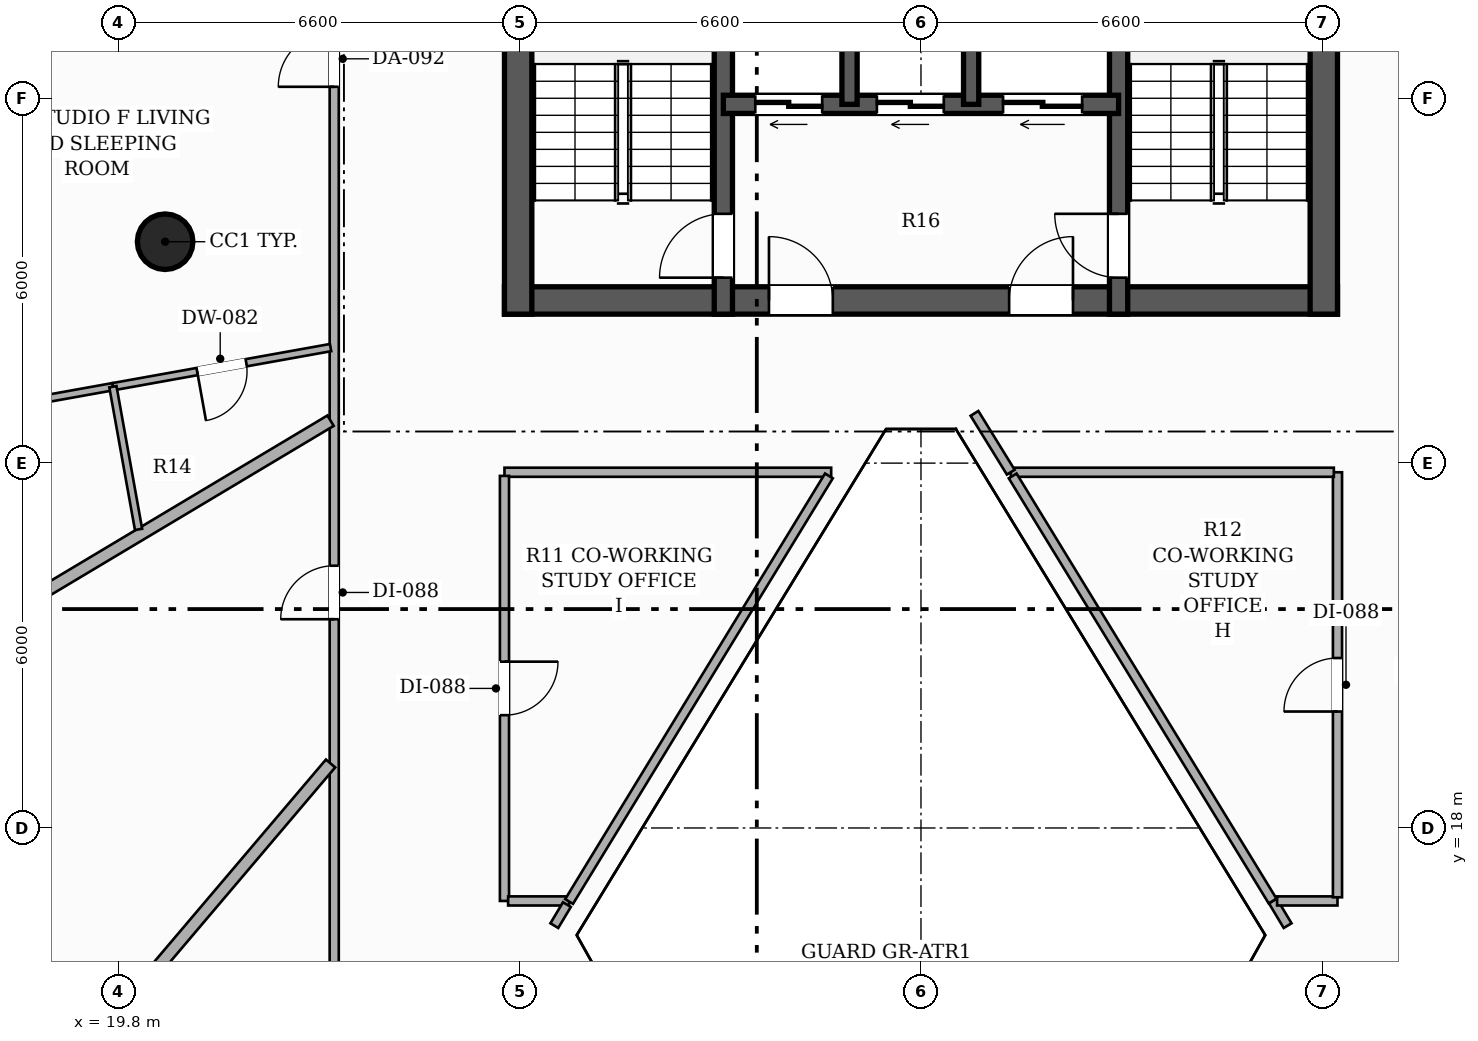
"""IFC4 building model, lengths in metres.
Left out: names, types, materials, properties, quantities, classifications, styles, units other than length and angle.
Written with IfcOpenShell. Run it as: python <this file> out.ifc"""

import sys

from ifc_helpers import new_model, si_unit, direction, frame, frame_2d, origin, origin_2d, place, context, subcontext, project, spatial, rectangle, hollow_circle, extrude, element, fill, save


model = new_model("IFC4")
c1 = context("Model", 3, precision=1e-05, world=origin(), true_north=direction((0.0, 1.0)))
c2 = subcontext(c1, "Body", "Model", "MODEL_VIEW")
j1 = project(units=[si_unit("LENGTHUNIT", "METRE"), si_unit("PLANEANGLEUNIT", "RADIAN")], contexts=[c1])
p1 = place(None, origin())
s1 = spatial("IfcSite", under=j1, at=p1, CompositionType="ELEMENT")
p2 = place(p1, origin())
s2 = spatial("IfcBuilding", under=s1, at=p2, CompositionType="ELEMENT")
p3 = place(p2, frame((0.0, 0.0, 23.6)))
s3 = spatial("IfcBuildingStorey", under=s2, at=p3, CompositionType="ELEMENT", Elevation=23.6)
p4 = place(p3, frame((26.15, 26.675, 0.0), z_axis=(0.0, 0.0, 1.0), x_axis=(1.0, 0.0, 0.0)))
e1 = element("IfcWall", 1, at=p4, inside=s3, PredefinedType="SHEAR", context=c2, shape_type="SweptSolid", body=[
    extrude(rectangle(XDim=13.7, YDim=0.45, at=frame_2d((6.85, 0.0))), origin(), (0.0, 0.0, 1.0), 3.3),
])
p5 = place(p4, frame((4.35, 0.0, 0.0)))
e2 = element("IfcOpeningElement", 2, at=p5, cuts=e1, PredefinedType="OPENING", context=c2, shape_type="SweptSolid", body=[
    extrude(rectangle(XDim=1.05, YDim=2.15, at=frame_2d((0.525, 1.075))), frame((0.0, 0.235, 0.0), z_axis=(0.0, -1.0, 0.0), x_axis=(1.0, 0.0, 0.0)), (0.0, 0.0, 1.0), 0.47),
])
p6 = place(p4, frame((8.3, 0.0, 0.0)))
e3 = element("IfcOpeningElement", 3, at=p6, cuts=e1, PredefinedType="OPENING", context=c2, shape_type="SweptSolid", body=[
    extrude(rectangle(XDim=1.05, YDim=2.15, at=frame_2d((0.525, 1.075))), frame((0.0, 0.235, 0.0), z_axis=(0.0, -1.0, 0.0), x_axis=(1.0, 0.0, 0.0)), (0.0, 0.0, 1.0), 0.47),
])
for number, where, z_axis, x_axis in (
    (4, (26.375, 26.45, 0.0), (0.0, 0.0, 1.0), (0.0, 1.0, 0.0)),
    (5, (39.625, 26.45, 0.0), (0.0, 0.0, 1.0), (0.0, 1.0, 0.0)),
):
    element("IfcWall", number, at=place(p3, frame(where, z_axis=z_axis, x_axis=x_axis)), inside=s3, PredefinedType="SHEAR", context=c2, shape_type="SweptSolid", body=[
        extrude(rectangle(XDim=7.7, YDim=0.45, at=frame_2d((3.85, 0.0))), origin(), (0.0, 0.0, 1.0), 3.3),
    ])
p7 = place(p3, frame((29.75, 26.45, 0.0), z_axis=(0.0, 0.0, 1.0), x_axis=(0.0, 1.0, 0.0)))
e6 = element("IfcWall", 6, at=p7, inside=s3, PredefinedType="SHEAR", context=c2, shape_type="SweptSolid", body=[
    extrude(rectangle(XDim=8.2, YDim=0.3, at=frame_2d((4.1, 0.0))), origin(), (0.0, 0.0, 1.0), 3.3),
])
p8 = place(p7, frame((0.6, 0.0, 0.0)))
e7 = element("IfcOpeningElement", 7, at=p8, cuts=e6, PredefinedType="OPENING", context=c2, shape_type="SweptSolid", body=[
    extrude(rectangle(XDim=1.05, YDim=2.15, at=frame_2d((0.525, 1.075))), frame((0.0, 0.16, 0.0), z_axis=(0.0, -1.0, 0.0), x_axis=(1.0, 0.0, 0.0)), (0.0, 0.0, 1.0), 0.32),
])
p9 = place(p3, frame((36.25, 26.45, 0.0), z_axis=(0.0, 0.0, 1.0), x_axis=(0.0, 1.0, 0.0)))
e8 = element("IfcWall", 8, at=p9, inside=s3, PredefinedType="SHEAR", context=c2, shape_type="SweptSolid", body=[
    extrude(rectangle(XDim=8.2, YDim=0.3, at=frame_2d((4.1, 0.0))), origin(), (0.0, 0.0, 1.0), 3.3),
])
p10 = place(p9, frame((0.6, 0.0, 0.0)))
e9 = element("IfcOpeningElement", 9, at=p10, cuts=e8, PredefinedType="OPENING", context=c2, shape_type="SweptSolid", body=[
    extrude(rectangle(XDim=1.05, YDim=2.15, at=frame_2d((0.525, 1.075))), frame((0.0, 0.16, 0.0), z_axis=(0.0, -1.0, 0.0), x_axis=(1.0, 0.0, 0.0)), (0.0, 0.0, 1.0), 0.32),
])
p11 = place(p3, frame((36.25, 29.9, 0.0), z_axis=(0.0, 0.0, 1.0), x_axis=(-1.0, 0.0, 0.0)))
e10 = element("IfcWall", 10, at=p11, inside=s3, PredefinedType="SHEAR", context=c2, shape_type="SweptSolid", body=[
    extrude(rectangle(XDim=6.5, YDim=0.3, at=frame_2d((3.25, 0.0))), origin(), (0.0, 0.0, 1.0), 3.3),
])
p12 = place(p11, frame((4.875, 0.0, 0.0)))
e11 = element("IfcOpeningElement", 11, at=p12, cuts=e10, PredefinedType="OPENING", context=c2, shape_type="SweptSolid", body=[
    extrude(rectangle(XDim=1.1, YDim=2.2, at=frame_2d((0.55, 1.1))), frame((0.0, 0.16, 0.0), z_axis=(0.0, -1.0, 0.0), x_axis=(1.0, 0.0, 0.0)), (0.0, 0.0, 1.0), 0.32),
])
p13 = place(p11, frame((2.875, 0.0, 0.0)))
e12 = element("IfcOpeningElement", 12, at=p13, cuts=e10, PredefinedType="OPENING", context=c2, shape_type="SweptSolid", body=[
    extrude(rectangle(XDim=1.1, YDim=2.2, at=frame_2d((0.55, 1.1))), frame((0.0, 0.16, 0.0), z_axis=(0.0, -1.0, 0.0), x_axis=(1.0, 0.0, 0.0)), (0.0, 0.0, 1.0), 0.32),
])
p14 = place(p11, frame((0.6, 0.0, 0.0)))
e13 = element("IfcOpeningElement", 13, at=p14, cuts=e10, PredefinedType="OPENING", context=c2, shape_type="SweptSolid", body=[
    extrude(rectangle(XDim=1.3, YDim=2.2, at=frame_2d((0.65, 1.1))), frame((0.0, 0.16, 0.0), z_axis=(0.0, -1.0, 0.0), x_axis=(1.0, 0.0, 0.0)), (0.0, 0.0, 1.0), 0.32),
])
for number, where, z_axis, x_axis in (
    (14, (31.825, 29.9, 0.0), (0.0, 0.0, 1.0), (0.0, 1.0, 0.0)),
    (15, (33.825, 29.9, 0.0), (0.0, 0.0, 1.0), (0.0, 1.0, 0.0)),
):
    element("IfcWall", number, at=place(p3, frame(where, z_axis=z_axis, x_axis=x_axis)), inside=s3, PredefinedType="SHEAR", context=c2, shape_type="SweptSolid", body=[
        extrude(rectangle(XDim=2.9, YDim=0.25, at=frame_2d((1.45, 0.0))), origin(), (0.0, 0.0, 1.0), 3.3),
    ])
p15 = place(p3, frame((20.569, 27.641, 0.0), z_axis=(0.0, 0.0, 1.0), x_axis=(1.0, 0.0, 0.0)))
e16 = element("IfcColumn", 16, at=p15, inside=s3, PredefinedType="COLUMN", context=c2, shape_type="SweptSolid", body=[
    extrude(hollow_circle(Radius=0.457, WallThickness=0.025, at=origin_2d()), origin(), (0.0, 0.0, 1.0), 3.3),
])
p16 = place(p3, frame((18.957, 36.16, 0.0), z_axis=(0.0, 0.0, 1.0), x_axis=(-0.514409031138, -0.857544954323, 0.0)))
e17 = element("IfcWall", 17, at=p16, inside=s3, PredefinedType="SOLIDWALL", context=c2, shape_type="SweptSolid", body=[
    extrude(rectangle(XDim=13.248, YDim=0.24, at=frame_2d((6.624, 0.0))), origin(), (0.0, 0.0, 1.0), 2.624),
])
p17 = place(p16, frame((5.724, 0.0, 0.0)))
e18 = element("IfcOpeningElement", 18, at=p17, cuts=e17, PredefinedType="OPENING", context=c2, shape_type="SweptSolid", body=[
    extrude(rectangle(XDim=1.8, YDim=2.2, at=frame_2d((0.9, 1.1))), frame((0.0, 0.13, 0.0), z_axis=(0.0, -1.0, 0.0), x_axis=(1.0, 0.0, 0.0)), (0.0, 0.0, 1.0), 0.26),
])
p18 = place(p3, frame((23.35, 11.86, 0.0), z_axis=(0.0, 0.0, 1.0), x_axis=(0.0, 1.0, 0.0)))
e19 = element("IfcWall", 19, at=p18, inside=s3, PredefinedType="PARTITIONING", context=c2, shape_type="SweptSolid", body=[
    extrude(rectangle(XDim=25.04, YDim=0.15, at=frame_2d((12.52, 0.0))), origin(), (0.0, 0.0, 1.0), 2.413),
])
p19 = place(p18, frame((9.573, 0.0, 0.0)))
e20 = element("IfcOpeningElement", 20, at=p19, cuts=e19, PredefinedType="OPENING", context=c2, shape_type="SweptSolid", body=[
    extrude(rectangle(XDim=0.88, YDim=2.1, at=frame_2d((0.44, 1.05))), frame((0.0, 0.085, 0.0), z_axis=(0.0, -1.0, 0.0), x_axis=(1.0, 0.0, 0.0)), (0.0, 0.0, 1.0), 0.17),
])
p20 = place(p18, frame((18.329, 0.0, 0.0)))
e21 = element("IfcOpeningElement", 21, at=p20, cuts=e19, PredefinedType="OPENING", context=c2, shape_type="SweptSolid", body=[
    extrude(rectangle(XDim=0.92, YDim=2.15, at=frame_2d((0.46, 1.075))), frame((0.0, 0.085, 0.0), z_axis=(0.0, -1.0, 0.0), x_axis=(1.0, 0.0, 0.0)), (0.0, 0.0, 1.0), 0.17),
])
p21 = place(p3, frame((31.523, 23.85, 0.0), z_axis=(0.0, 0.0, 1.0), x_axis=(-1.0, 0.0, 0.0)))
e22 = element("IfcWall", 22, at=p21, inside=s3, PredefinedType="PARTITIONING", context=c2, shape_type="SweptSolid", body=[
    extrude(rectangle(XDim=5.373, YDim=0.15, at=frame_2d((2.687, 0.0))), origin(), (0.0, 0.0, 1.0), 2.669),
])
p22 = place(p3, frame((26.15, 23.79, 0.0), z_axis=(0.0, 0.0, 1.0), x_axis=(0.0, -1.0, 0.0)))
e23 = element("IfcWall", 23, at=p22, inside=s3, PredefinedType="PARTITIONING", context=c2, shape_type="SweptSolid", body=[
    extrude(rectangle(XDim=6.99, YDim=0.15, at=frame_2d((3.495, 0.0))), origin(), (0.0, 0.0, 1.0), 2.669),
])
p23 = place(p22, frame((3.055, 0.0, 0.0)))
e24 = element("IfcOpeningElement", 24, at=p23, cuts=e23, PredefinedType="OPENING", context=c2, shape_type="SweptSolid", body=[
    extrude(rectangle(XDim=0.88, YDim=2.1, at=frame_2d((0.44, 1.05))), frame((0.0, 0.085, 0.0), z_axis=(0.0, -1.0, 0.0), x_axis=(1.0, 0.0, 0.0)), (0.0, 0.0, 1.0), 0.17),
])
p24 = place(p3, frame((26.21, 16.8, 0.0), z_axis=(0.0, 0.0, 1.0), x_axis=(1.0, 0.0, 0.0)))
e25 = element("IfcWall", 25, at=p24, inside=s3, PredefinedType="PARTITIONING", context=c2, shape_type="SweptSolid", body=[
    extrude(rectangle(XDim=1.003, YDim=0.15, at=frame_2d((0.501, 0.0))), origin(), (0.0, 0.0, 1.0), 3.06),
])
p25 = place(p3, frame((27.177, 16.74, 0.0), z_axis=(0.0, 0.0, 1.0), x_axis=(-0.513515835534, -0.858080116688, 0.0)))
e26 = element("IfcWall", 26, at=p25, inside=s3, PredefinedType="PARTITIONING", context=c2, shape_type="SweptSolid", body=[
    extrude(rectangle(XDim=0.403, YDim=0.15, at=frame_2d((0.202, 0.0))), origin(), (0.0, 0.0, 1.0), 3.06),
])
p26 = place(p3, frame((39.03, 16.394, 0.0), z_axis=(0.0, 0.0, 1.0), x_axis=(-0.51343298076, 0.858129695482, 0.0)))
e27 = element("IfcWall", 27, at=p26, inside=s3, PredefinedType="PARTITIONING", context=c2, shape_type="SweptSolid", body=[
    extrude(rectangle(XDim=0.473, YDim=0.15, at=frame_2d((0.237, 0.0))), origin(), (0.0, 0.0, 1.0), 3.06),
])
p27 = place(p3, frame((38.857, 16.8, 0.0), z_axis=(0.0, 0.0, 1.0), x_axis=(1.0, 0.0, 0.0)))
e28 = element("IfcWall", 28, at=p27, inside=s3, PredefinedType="PARTITIONING", context=c2, shape_type="SweptSolid", body=[
    extrude(rectangle(XDim=0.993, YDim=0.15, at=frame_2d((0.497, 0.0))), origin(), (0.0, 0.0, 1.0), 3.06),
])
p28 = place(p3, frame((39.85, 16.86, 0.0), z_axis=(0.0, 0.0, 1.0), x_axis=(0.0, 1.0, 0.0)))
e29 = element("IfcWall", 29, at=p28, inside=s3, PredefinedType="PARTITIONING", context=c2, shape_type="SweptSolid", body=[
    extrude(rectangle(XDim=6.99, YDim=0.15, at=frame_2d((3.495, 0.0))), origin(), (0.0, 0.0, 1.0), 2.669),
])
p29 = place(p28, frame((3.055, 0.0, 0.0)))
e30 = element("IfcOpeningElement", 30, at=p29, cuts=e29, PredefinedType="OPENING", context=c2, shape_type="SweptSolid", body=[
    extrude(rectangle(XDim=0.88, YDim=2.1, at=frame_2d((0.44, 1.05))), frame((0.0, 0.085, 0.0), z_axis=(0.0, -1.0, 0.0), x_axis=(1.0, 0.0, 0.0)), (0.0, 0.0, 1.0), 0.17),
])
p30 = place(p3, frame((39.79, 23.85, 0.0), z_axis=(0.0, 0.0, 1.0), x_axis=(-1.0, 0.0, 0.0)))
e31 = element("IfcWall", 31, at=p30, inside=s3, PredefinedType="PARTITIONING", context=c2, shape_type="SweptSolid", body=[
    extrude(rectangle(XDim=5.313, YDim=0.15, at=frame_2d((2.656, 0.0))), origin(), (0.0, 0.0, 1.0), 2.669),
])
p31 = place(p3, frame((34.477, 23.851, 0.0), z_axis=(0.0, 0.0, 1.0), x_axis=(-0.52541513414, 0.8508460124, 0.0)))
e32 = element("IfcWall", 32, at=p31, inside=s3, PredefinedType="PARTITIONING", context=c2, shape_type="SweptSolid", body=[
    extrude(rectangle(XDim=1.136, YDim=0.15, at=frame_2d((0.568, 0.0))), origin(), (0.0, 0.0, 1.0), 3.06),
])
p32 = place(p3, frame((27.213, 16.791, 0.0), z_axis=(0.0, 0.0, 1.0), x_axis=(0.521095914239, 0.853498124288, 0.0)))
e33 = element("IfcWall", 33, at=p32, inside=s3, PredefinedType="PARTITIONING", context=c2, shape_type="SweptSolid", body=[
    extrude(rectangle(XDim=8.2, YDim=0.15, at=frame_2d((4.1, 0.0))), origin(), (0.0, 0.0, 1.0), 2.669),
])
p33 = place(p3, frame((34.508, 23.79, 0.0), z_axis=(0.0, 0.0, 1.0), x_axis=(0.52163195406, -0.853170618636, 0.0)))
e34 = element("IfcWall", 34, at=p33, inside=s3, PredefinedType="PARTITIONING", context=c2, shape_type="SweptSolid", body=[
    extrude(rectangle(XDim=8.195, YDim=0.15, at=frame_2d((4.098, 0.0))), origin(), (0.0, 0.0, 1.0), 2.669),
])
p34 = place(p3, frame((9.583, 2.913, 0.0), z_axis=(0.0, 0.0, 1.0), x_axis=(0.647135024662, 0.76237540612, 0.0)))
e35 = element("IfcWall", 35, at=p34, inside=s3, PredefinedType="PARTITIONING", context=c2, shape_type="SweptSolid", body=[
    extrude(rectangle(XDim=21.181, YDim=0.2, at=frame_2d((10.591, 0.0))), origin(), (0.0, 0.0, 1.0), 2.413),
])
p35 = place(p3, frame((7.616, 15.333, 0.0), z_axis=(0.0, 0.0, 1.0), x_axis=(0.85844474206, 0.512906058483, 0.0)))
e36 = element("IfcWall", 36, at=p35, inside=s3, PredefinedType="PARTITIONING", context=c2, shape_type="SweptSolid", body=[
    extrude(rectangle(XDim=18.259, YDim=0.2, at=frame_2d((9.129, 0.0))), origin(), (0.0, 0.0, 1.0), 2.413),
])
p36 = place(p3, frame((23.29, 25.9, 0.0), z_axis=(0.0, 0.0, 1.0), x_axis=(-0.984259533521, -0.176729088363, 0.0)))
e37 = element("IfcWall", 37, at=p36, inside=s3, PredefinedType="PARTITIONING", context=c2, shape_type="SweptSolid", body=[
    extrude(rectangle(XDim=3.637, YDim=0.12, at=frame_2d((1.819, 0.0))), origin(), (0.0, 0.0, 1.0), 2.669),
])
p37 = place(p36, frame((1.409, 0.0, 0.0)))
e38 = element("IfcOpeningElement", 38, at=p37, cuts=e37, PredefinedType="OPENING", context=c2, shape_type="SweptSolid", body=[
    extrude(rectangle(XDim=0.82, YDim=2.1, at=frame_2d((0.41, 1.05))), frame((0.0, 0.07, 0.0), z_axis=(0.0, -1.0, 0.0), x_axis=(1.0, 0.0, 0.0)), (0.0, 0.0, 1.0), 0.14),
])
p38 = place(p3, frame((19.71, 25.257, 0.0), z_axis=(0.0, 0.0, 1.0), x_axis=(-0.984233964359, -0.176871431843, 0.0)))
e39 = element("IfcWall", 39, at=p38, inside=s3, PredefinedType="PARTITIONING", context=c2, shape_type="SweptSolid", body=[
    extrude(rectangle(XDim=4.065, YDim=0.12, at=frame_2d((2.033, 0.0))), origin(), (0.0, 0.0, 1.0), 2.413),
])
p39 = place(p38, frame((1.593, 0.0, 0.0)))
e40 = element("IfcOpeningElement", 40, at=p39, cuts=e39, PredefinedType="OPENING", context=c2, shape_type="SweptSolid", body=[
    extrude(rectangle(XDim=0.88, YDim=2.1, at=frame_2d((0.44, 1.05))), frame((0.0, 0.07, 0.0), z_axis=(0.0, -1.0, 0.0), x_axis=(1.0, 0.0, 0.0)), (0.0, 0.0, 1.0), 0.14),
])
p40 = place(p3, frame((20.132, 22.91, 0.0), z_axis=(0.0, 0.0, 1.0), x_axis=(-0.177002273268, 0.984210442567, 0.0)))
e41 = element("IfcWall", 41, at=p40, inside=s3, PredefinedType="PARTITIONING", context=c2, shape_type="SweptSolid", body=[
    extrude(rectangle(XDim=2.385, YDim=0.12, at=frame_2d((1.192, 0.0))), origin(), (0.0, 0.0, 1.0), 2.669),
])
p41 = place(p8, origin())
e42 = element("IfcDoor", 42, at=p41, inside=s3, OperationType="SINGLE_SWING_LEFT", PredefinedType="DOOR", context=c2, shape_type="SweptSolid", body=[
    extrude(rectangle(XDim=1.05, YDim=2.15, at=frame_2d((0.525, 1.075))), frame((0.0, 0.025, 0.0), z_axis=(0.0, -1.0, 0.0), x_axis=(1.0, 0.0, 0.0)), (0.0, 0.0, 1.0), 0.05),
])
fill(e7, e42)
p42 = place(p10, origin())
e43 = element("IfcDoor", 43, at=p42, inside=s3, OperationType="SINGLE_SWING_RIGHT", PredefinedType="DOOR", context=c2, shape_type="SweptSolid", body=[
    extrude(rectangle(XDim=1.05, YDim=2.15, at=frame_2d((0.525, 1.075))), frame((0.0, 0.025, 0.0), z_axis=(0.0, -1.0, 0.0), x_axis=(1.0, 0.0, 0.0)), (0.0, 0.0, 1.0), 0.05),
])
fill(e9, e43)
p43 = place(p5, origin())
e44 = element("IfcDoor", 44, at=p43, inside=s3, OperationType="SINGLE_SWING_LEFT", PredefinedType="DOOR", context=c2, shape_type="SweptSolid", body=[
    extrude(rectangle(XDim=1.05, YDim=2.15, at=frame_2d((0.525, 1.075))), frame((0.0, 0.025, 0.0), z_axis=(0.0, -1.0, 0.0), x_axis=(1.0, 0.0, 0.0)), (0.0, 0.0, 1.0), 0.05),
])
fill(e2, e44)
p44 = place(p6, origin())
e45 = element("IfcDoor", 45, at=p44, inside=s3, OperationType="SINGLE_SWING_RIGHT", PredefinedType="DOOR", context=c2, shape_type="SweptSolid", body=[
    extrude(rectangle(XDim=1.05, YDim=2.15, at=frame_2d((0.525, 1.075))), frame((0.0, 0.025, 0.0), z_axis=(0.0, -1.0, 0.0), x_axis=(1.0, 0.0, 0.0)), (0.0, 0.0, 1.0), 0.05),
])
fill(e3, e45)
p45 = place(p12, origin())
e46 = element("IfcDoor", 46, at=p45, inside=s3, OperationType="DOUBLE_DOOR_SLIDING", PredefinedType="DOOR", context=c2, shape_type="SweptSolid", body=[
    extrude(rectangle(XDim=1.1, YDim=2.2, at=frame_2d((0.55, 1.1))), frame((0.0, 0.025, 0.0), z_axis=(0.0, -1.0, 0.0), x_axis=(1.0, 0.0, 0.0)), (0.0, 0.0, 1.0), 0.05),
])
fill(e11, e46)
p46 = place(p13, origin())
e47 = element("IfcDoor", 47, at=p46, inside=s3, OperationType="DOUBLE_DOOR_SLIDING", PredefinedType="DOOR", context=c2, shape_type="SweptSolid", body=[
    extrude(rectangle(XDim=1.1, YDim=2.2, at=frame_2d((0.55, 1.1))), frame((0.0, 0.025, 0.0), z_axis=(0.0, -1.0, 0.0), x_axis=(1.0, 0.0, 0.0)), (0.0, 0.0, 1.0), 0.05),
])
fill(e12, e47)
p47 = place(p14, origin())
e48 = element("IfcDoor", 48, at=p47, inside=s3, OperationType="DOUBLE_DOOR_SLIDING", PredefinedType="DOOR", context=c2, shape_type="SweptSolid", body=[
    extrude(rectangle(XDim=1.3, YDim=2.2, at=frame_2d((0.65, 1.1))), frame((0.0, 0.025, 0.0), z_axis=(0.0, -1.0, 0.0), x_axis=(1.0, 0.0, 0.0)), (0.0, 0.0, 1.0), 0.05),
])
fill(e13, e48)
p48 = place(p19, origin())
e49 = element("IfcDoor", 49, at=p48, inside=s3, OperationType="SINGLE_SWING_LEFT", PredefinedType="DOOR", context=c2, shape_type="SweptSolid", body=[
    extrude(rectangle(XDim=0.88, YDim=2.1, at=frame_2d((0.44, 1.05))), frame((0.0, 0.025, 0.0), z_axis=(0.0, -1.0, 0.0), x_axis=(1.0, 0.0, 0.0)), (0.0, 0.0, 1.0), 0.05),
])
fill(e20, e49)
p49 = place(p20, origin())
e50 = element("IfcDoor", 50, at=p49, inside=s3, OperationType="SINGLE_SWING_LEFT", PredefinedType="DOOR", context=c2, shape_type="SweptSolid", body=[
    extrude(rectangle(XDim=0.92, YDim=2.15, at=frame_2d((0.46, 1.075))), frame((0.0, 0.025, 0.0), z_axis=(0.0, -1.0, 0.0), x_axis=(1.0, 0.0, 0.0)), (0.0, 0.0, 1.0), 0.05),
])
fill(e21, e50)
p50 = place(p37, origin())
e51 = element("IfcDoor", 51, at=p50, inside=s3, OperationType="SINGLE_SWING_RIGHT", PredefinedType="DOOR", context=c2, shape_type="SweptSolid", body=[
    extrude(rectangle(XDim=0.82, YDim=2.1, at=frame_2d((0.41, 1.05))), frame((0.0, 0.025, 0.0), z_axis=(0.0, -1.0, 0.0), x_axis=(1.0, 0.0, 0.0)), (0.0, 0.0, 1.0), 0.05),
])
fill(e38, e51)
p51 = place(p29, origin())
e52 = element("IfcDoor", 52, at=p51, inside=s3, OperationType="SINGLE_SWING_LEFT", PredefinedType="DOOR", context=c2, shape_type="SweptSolid", body=[
    extrude(rectangle(XDim=0.88, YDim=2.1, at=frame_2d((0.44, 1.05))), frame((0.0, 0.025, 0.0), z_axis=(0.0, -1.0, 0.0), x_axis=(1.0, 0.0, 0.0)), (0.0, 0.0, 1.0), 0.05),
])
fill(e30, e52)
p52 = place(p23, origin())
e53 = element("IfcDoor", 53, at=p52, inside=s3, OperationType="SINGLE_SWING_LEFT", PredefinedType="DOOR", context=c2, shape_type="SweptSolid", body=[
    extrude(rectangle(XDim=0.88, YDim=2.1, at=frame_2d((0.44, 1.05))), frame((0.0, 0.025, 0.0), z_axis=(0.0, -1.0, 0.0), x_axis=(1.0, 0.0, 0.0)), (0.0, 0.0, 1.0), 0.05),
])
fill(e24, e53)
save(model, sys.argv[1])
